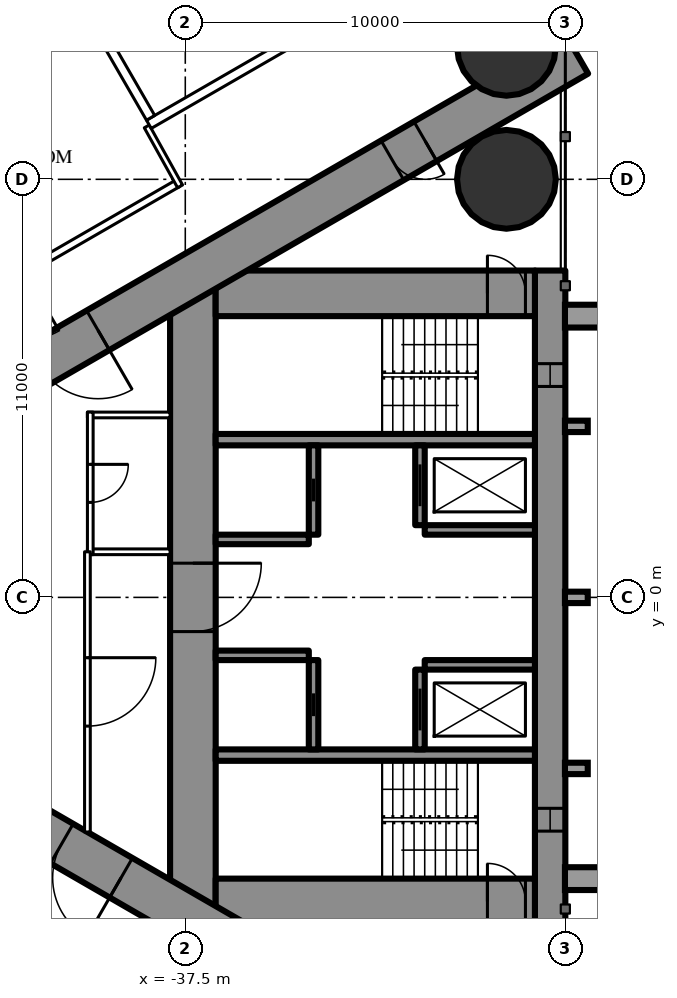
"""IFC4 building model, lengths in metres.
Left out: names, types, materials, properties, quantities, classifications, styles, units other than length and angle.
Written with IfcOpenShell. Run it as: python <this file> out.ifc"""

import sys

from ifc_helpers import new_model, si_unit, direction, frame, frame_2d, origin, origin_2d, place, context, subcontext, project, spatial, rectangle, hollow_circle, extrude, element, fill, save


model = new_model("IFC4")
c1 = context("Model", 3, precision=1e-05, world=origin(), true_north=direction((0.0, 1.0)))
c2 = subcontext(c1, "Body", "Model", "MODEL_VIEW")
j1 = project(units=[si_unit("LENGTHUNIT", "METRE"), si_unit("PLANEANGLEUNIT", "RADIAN")], contexts=[c1])
p1 = place(None, origin())
s1 = spatial("IfcSite", under=j1, at=p1, CompositionType="ELEMENT")
p2 = place(p1, origin())
s2 = spatial("IfcBuilding", under=s1, at=p2, CompositionType="ELEMENT")
p3 = place(p2, frame((0.0, 0.0, 143.1)))
s3 = spatial("IfcBuildingStorey", under=s2, at=p3, CompositionType="ELEMENT", Elevation=143.1)
for number, where, z_axis, x_axis in (
    (1, (-29.05, 11.0, 0.0), (0.0, 0.0, 1.0), (1.0, 0.0, 0.0)),
    (2, (-29.05, 14.5, 0.0), (0.0, 0.0, 1.0), (1.0, 0.0, 0.0)),
):
    element("IfcColumn", number, at=place(p3, frame(where, z_axis=z_axis, x_axis=x_axis)), inside=s3, PredefinedType="COLUMN", context=c2, shape_type="SweptSolid", body=[
        extrude(hollow_circle(Radius=1.3, WallThickness=0.1, at=origin_2d()), origin(), (0.0, 0.0, 1.0), 3.6),
    ])
p4 = place(p3, frame((-27.9, 8.6, 0.0), z_axis=(0.0, 0.0, 1.0), x_axis=(0.0, -1.0, 0.0)))
e3 = element("IfcWall", 3, at=p4, inside=s3, PredefinedType="SHEAR", context=c2, shape_type="SweptSolid", body=[
    extrude(rectangle(XDim=17.2, YDim=0.8, at=frame_2d((8.6, 0.0))), origin(), (0.0, 0.0, 1.0), 3.6),
])
p5 = place(p4, frame((2.45, 0.0, 0.6)))
e4 = element("IfcOpeningElement", 4, at=p5, cuts=e3, PredefinedType="OPENING", context=c2, shape_type="SweptSolid", body=[
    extrude(rectangle(XDim=0.6, YDim=2.1, at=frame_2d((0.3, 1.05))), frame((0.0, 0.41, 0.0), z_axis=(0.0, -1.0, 0.0), x_axis=(1.0, 0.0, 0.0)), (0.0, 0.0, 1.0), 0.82),
])
p6 = place(p4, frame((14.15, 0.0, 0.6)))
e5 = element("IfcOpeningElement", 5, at=p6, cuts=e3, PredefinedType="OPENING", context=c2, shape_type="SweptSolid", body=[
    extrude(rectangle(XDim=0.6, YDim=2.1, at=frame_2d((0.3, 1.05))), frame((0.0, 0.41, 0.0), z_axis=(0.0, -1.0, 0.0), x_axis=(1.0, 0.0, 0.0)), (0.0, 0.0, 1.0), 0.82),
])
p7 = place(p3, frame((-37.3, 8.6, 0.0), z_axis=(0.0, 0.0, 1.0), x_axis=(0.0, -1.0, 0.0)))
e6 = element("IfcWall", 6, at=p7, inside=s3, PredefinedType="SHEAR", context=c2, shape_type="SweptSolid", body=[
    extrude(rectangle(XDim=17.2, YDim=1.2, at=frame_2d((8.6, 0.0))), origin(), (0.0, 0.0, 1.0), 3.6),
])
p8 = place(p7, frame((7.7, 0.0, 0.0)))
e7 = element("IfcOpeningElement", 7, at=p8, cuts=e6, PredefinedType="OPENING", context=c2, shape_type="SweptSolid", body=[
    extrude(rectangle(XDim=1.8, YDim=2.2, at=frame_2d((0.9, 1.1))), frame((0.0, 0.61, 0.0), z_axis=(0.0, -1.0, 0.0), x_axis=(1.0, 0.0, 0.0)), (0.0, 0.0, 1.0), 1.22),
])
p9 = place(p3, frame((-28.3, 8.0, 0.0), z_axis=(0.0, 0.0, 1.0), x_axis=(-1.0, 0.0, 0.0)))
e8 = element("IfcWall", 8, at=p9, inside=s3, PredefinedType="SHEAR", context=c2, shape_type="SweptSolid", body=[
    extrude(rectangle(XDim=8.4, YDim=1.2, at=frame_2d((4.2, 0.0))), origin(), (0.0, 0.0, 1.0), 3.6),
])
p10 = place(p9, frame((0.25, 0.0, 0.0)))
e9 = element("IfcOpeningElement", 9, at=p10, cuts=e8, PredefinedType="OPENING", context=c2, shape_type="SweptSolid", body=[
    extrude(rectangle(XDim=1.0, YDim=2.2, at=frame_2d((0.5, 1.1))), frame((0.0, 0.61, 0.0), z_axis=(0.0, -1.0, 0.0), x_axis=(1.0, 0.0, 0.0)), (0.0, 0.0, 1.0), 1.22),
])
p11 = place(p3, frame((-28.3, -8.0, 0.0), z_axis=(0.0, 0.0, 1.0), x_axis=(-1.0, 0.0, 0.0)))
e10 = element("IfcWall", 10, at=p11, inside=s3, PredefinedType="SHEAR", context=c2, shape_type="SweptSolid", body=[
    extrude(rectangle(XDim=8.4, YDim=1.2, at=frame_2d((4.2, 0.0))), origin(), (0.0, 0.0, 1.0), 3.6),
])
p12 = place(p11, frame((0.25, 0.0, 0.0)))
e11 = element("IfcOpeningElement", 11, at=p12, cuts=e10, PredefinedType="OPENING", context=c2, shape_type="SweptSolid", body=[
    extrude(rectangle(XDim=1.0, YDim=2.2, at=frame_2d((0.5, 1.1))), frame((0.0, 0.61, 0.0), z_axis=(0.0, -1.0, 0.0), x_axis=(1.0, 0.0, 0.0)), (0.0, 0.0, 1.0), 1.22),
])
for number, where, z_axis, x_axis in (
    (12, (-28.3, 4.15, 0.0), (0.0, 0.0, 1.0), (-1.0, 0.0, 0.0)),
    (13, (-28.3, -4.15, 0.0), (0.0, 0.0, 1.0), (-1.0, 0.0, 0.0)),
):
    element("IfcWall", number, at=place(p3, frame(where, z_axis=z_axis, x_axis=x_axis)), inside=s3, PredefinedType="SHEAR", context=c2, shape_type="SweptSolid", body=[
        extrude(rectangle(XDim=8.4, YDim=0.3, at=frame_2d((4.2, 0.0))), origin(), (0.0, 0.0, 1.0), 3.6),
    ])
p13 = place(p3, frame((-31.325, 4.0, 0.0), z_axis=(0.0, 0.0, 1.0), x_axis=(0.0, -1.0, 0.0)))
e14 = element("IfcWall", 14, at=p13, inside=s3, PredefinedType="SHEAR", context=c2, shape_type="SweptSolid", body=[
    extrude(rectangle(XDim=2.1, YDim=0.25, at=frame_2d((1.05, 0.0))), origin(), (0.0, 0.0, 1.0), 3.6),
])
p14 = place(p13, frame((0.5, 0.0, 0.0)))
e15 = element("IfcOpeningElement", 15, at=p14, cuts=e14, PredefinedType="OPENING", context=c2, shape_type="SweptSolid", body=[
    extrude(rectangle(XDim=1.1, YDim=2.2, at=frame_2d((0.55, 1.1))), frame((0.0, 0.135, 0.0), z_axis=(0.0, -1.0, 0.0), x_axis=(1.0, 0.0, 0.0)), (0.0, 0.0, 1.0), 0.27),
])
p15 = place(p3, frame((-34.125, 4.0, 0.0), z_axis=(0.0, 0.0, 1.0), x_axis=(0.0, -1.0, 0.0)))
e16 = element("IfcWall", 16, at=p15, inside=s3, PredefinedType="SHEAR", context=c2, shape_type="SweptSolid", body=[
    extrude(rectangle(XDim=2.35, YDim=0.25, at=frame_2d((1.175, 0.0))), origin(), (0.0, 0.0, 1.0), 3.6),
])
p16 = place(p15, frame((0.875, 0.0, 0.0)))
e17 = element("IfcOpeningElement", 17, at=p16, cuts=e16, PredefinedType="OPENING", context=c2, shape_type="SweptSolid", body=[
    extrude(rectangle(XDim=0.6, YDim=2.0, at=frame_2d((0.3, 1.0))), frame((0.0, 0.135, 0.0), z_axis=(0.0, -1.0, 0.0), x_axis=(1.0, 0.0, 0.0)), (0.0, 0.0, 1.0), 0.27),
])
p17 = place(p3, frame((-28.3, 1.775, 0.0), z_axis=(0.0, 0.0, 1.0), x_axis=(-1.0, 0.0, 0.0)))
e18 = element("IfcWall", 18, at=p17, inside=s3, PredefinedType="SHEAR", context=c2, shape_type="SweptSolid", body=[
    extrude(rectangle(XDim=2.9, YDim=0.25, at=frame_2d((1.45, 0.0))), origin(), (0.0, 0.0, 1.0), 3.6),
])
p18 = place(p3, frame((-34.25, 1.525, 0.0), z_axis=(0.0, 0.0, 1.0), x_axis=(-1.0, 0.0, 0.0)))
e19 = element("IfcWall", 19, at=p18, inside=s3, PredefinedType="SHEAR", context=c2, shape_type="SweptSolid", body=[
    extrude(rectangle(XDim=2.45, YDim=0.25, at=frame_2d((1.225, 0.0))), origin(), (0.0, 0.0, 1.0), 3.6),
])
p19 = place(p3, frame((-31.325, -1.9, 0.0), z_axis=(0.0, 0.0, 1.0), x_axis=(0.0, -1.0, 0.0)))
e20 = element("IfcWall", 20, at=p19, inside=s3, PredefinedType="SHEAR", context=c2, shape_type="SweptSolid", body=[
    extrude(rectangle(XDim=2.1, YDim=0.25, at=frame_2d((1.05, 0.0))), origin(), (0.0, 0.0, 1.0), 3.6),
])
p20 = place(p19, frame((0.5, 0.0, 0.0)))
e21 = element("IfcOpeningElement", 21, at=p20, cuts=e20, PredefinedType="OPENING", context=c2, shape_type="SweptSolid", body=[
    extrude(rectangle(XDim=1.1, YDim=2.2, at=frame_2d((0.55, 1.1))), frame((0.0, 0.135, 0.0), z_axis=(0.0, -1.0, 0.0), x_axis=(1.0, 0.0, 0.0)), (0.0, 0.0, 1.0), 0.27),
])
p21 = place(p3, frame((-34.125, -1.65, 0.0), z_axis=(0.0, 0.0, 1.0), x_axis=(0.0, -1.0, 0.0)))
e22 = element("IfcWall", 22, at=p21, inside=s3, PredefinedType="SHEAR", context=c2, shape_type="SweptSolid", body=[
    extrude(rectangle(XDim=2.35, YDim=0.25, at=frame_2d((1.175, 0.0))), origin(), (0.0, 0.0, 1.0), 3.6),
])
p22 = place(p21, frame((0.875, 0.0, 0.0)))
e23 = element("IfcOpeningElement", 23, at=p22, cuts=e22, PredefinedType="OPENING", context=c2, shape_type="SweptSolid", body=[
    extrude(rectangle(XDim=0.6, YDim=2.0, at=frame_2d((0.3, 1.0))), frame((0.0, 0.135, 0.0), z_axis=(0.0, -1.0, 0.0), x_axis=(1.0, 0.0, 0.0)), (0.0, 0.0, 1.0), 0.27),
])
p23 = place(p3, frame((-28.3, -1.775, 0.0), z_axis=(0.0, 0.0, 1.0), x_axis=(-1.0, 0.0, 0.0)))
e24 = element("IfcWall", 24, at=p23, inside=s3, PredefinedType="SHEAR", context=c2, shape_type="SweptSolid", body=[
    extrude(rectangle(XDim=2.9, YDim=0.25, at=frame_2d((1.45, 0.0))), origin(), (0.0, 0.0, 1.0), 3.6),
])
p24 = place(p3, frame((-34.25, -1.525, 0.0), z_axis=(0.0, 0.0, 1.0), x_axis=(-1.0, 0.0, 0.0)))
e25 = element("IfcWall", 25, at=p24, inside=s3, PredefinedType="SHEAR", context=c2, shape_type="SweptSolid", body=[
    extrude(rectangle(XDim=2.45, YDim=0.25, at=frame_2d((1.225, 0.0))), origin(), (0.0, 0.0, 1.0), 3.6),
])
p25 = place(p3, frame((-27.2, 14.3, 0.0), z_axis=(0.0, 0.0, 1.0), x_axis=(-0.866026593062, -0.499997940104, 0.0)))
e26 = element("IfcWall", 26, at=p25, inside=s3, PredefinedType="SHEAR", context=c2, shape_type="SweptSolid", body=[
    extrude(rectangle(XDim=28.946, YDim=1.2, at=frame_2d((14.473, 0.0))), origin(), (0.0, 0.0, 1.0), 3.6),
])
p26 = place(p25, frame((4.6, 0.0, 0.0)))
e27 = element("IfcOpeningElement", 27, at=p26, cuts=e26, PredefinedType="OPENING", context=c2, shape_type="SweptSolid", body=[
    extrude(rectangle(XDim=1.0, YDim=2.2, at=frame_2d((0.5, 1.1))), frame((0.0, 0.61, 0.0), z_axis=(0.0, -1.0, 0.0), x_axis=(1.0, 0.0, 0.0)), (0.0, 0.0, 1.0), 1.22),
])
p27 = place(p25, frame((14.545, 0.0, 0.0)))
e28 = element("IfcOpeningElement", 28, at=p27, cuts=e26, PredefinedType="OPENING", context=c2, shape_type="SweptSolid", body=[
    extrude(rectangle(XDim=1.8, YDim=2.2, at=frame_2d((0.9, 1.1))), frame((0.0, 0.61, 0.0), z_axis=(0.0, -1.0, 0.0), x_axis=(1.0, 0.0, 0.0)), (0.0, 0.0, 1.0), 1.22),
])
p28 = place(p3, frame((-27.2, -14.3, 0.0), z_axis=(0.0, 0.0, 1.0), x_axis=(-0.866024021859, 0.500002393557, 0.0)))
e29 = element("IfcWall", 29, at=p28, inside=s3, PredefinedType="SHEAR", context=c2, shape_type="SweptSolid", body=[
    extrude(rectangle(XDim=27.907, YDim=1.2, at=frame_2d((13.954, 0.0))), origin(), (0.0, 0.0, 1.0), 3.6),
])
p29 = place(p28, frame((4.6, 0.0, 0.0)))
e30 = element("IfcOpeningElement", 30, at=p29, cuts=e29, PredefinedType="OPENING", context=c2, shape_type="SweptSolid", body=[
    extrude(rectangle(XDim=1.0, YDim=2.2, at=frame_2d((0.5, 1.1))), frame((0.0, 0.61, 0.0), z_axis=(0.0, -1.0, 0.0), x_axis=(1.0, 0.0, 0.0)), (0.0, 0.0, 1.0), 1.22),
])
p30 = place(p28, frame((13.845, 0.0, 0.0)))
e31 = element("IfcOpeningElement", 31, at=p30, cuts=e29, PredefinedType="OPENING", context=c2, shape_type="SweptSolid", body=[
    extrude(rectangle(XDim=1.8, YDim=2.2, at=frame_2d((0.9, 1.1))), frame((0.0, 0.61, 0.0), z_axis=(0.0, -1.0, 0.0), x_axis=(1.0, 0.0, 0.0)), (0.0, 0.0, 1.0), 1.22),
])
p31 = place(p3, frame((-41.245, 19.666, 0.0), z_axis=(0.0, 0.0, 1.0), x_axis=(-0.880492350889, -0.474060354835, 0.0)))
e32 = element("IfcWall", 32, at=p31, inside=s3, PredefinedType="SHEAR", context=c2, shape_type="SweptSolid", body=[
    extrude(rectangle(XDim=12.173, YDim=1.4, at=frame_2d((6.086, 0.0))), origin(), (0.0, 0.0, 1.0), 3.6),
])
p32 = place(p31, frame((4.586, 0.0, 0.6)))
e33 = element("IfcOpeningElement", 33, at=p32, cuts=e32, PredefinedType="OPENING", context=c2, shape_type="SweptSolid", body=[
    extrude(rectangle(XDim=3.0, YDim=1.2, at=frame_2d((1.5, 0.6))), frame((0.0, 0.71, 0.0), z_axis=(0.0, -1.0, 0.0), x_axis=(1.0, 0.0, 0.0)), (0.0, 0.0, 1.0), 1.42),
])
p33 = place(p3, frame((-37.7, 10.894, 0.0), z_axis=(0.0, 0.0, 1.0), x_axis=(-0.866027905338, -0.499995667157, 0.0)))
e34 = element("IfcWall", 34, at=p33, inside=s3, PredefinedType="PARTITIONING", context=c2, shape_type="SweptSolid", body=[
    extrude(rectangle(XDim=21.787, YDim=0.2, at=frame_2d((10.894, 0.0))), origin(), (0.0, 0.0, 1.0), 3.35),
])
p34 = place(p33, frame((14.296, 0.0, 0.0)))
e35 = element("IfcOpeningElement", 35, at=p34, cuts=e34, PredefinedType="OPENING", context=c2, shape_type="SweptSolid", body=[
    extrude(rectangle(XDim=1.8, YDim=2.2, at=frame_2d((0.9, 1.1))), frame((0.0, 0.11, 0.0), z_axis=(0.0, -1.0, 0.0), x_axis=(1.0, 0.0, 0.0)), (0.0, 0.0, 1.0), 0.22),
])
p35 = place(p33, frame((19.399, 0.0, 0.0)))
e36 = element("IfcOpeningElement", 36, at=p35, cuts=e34, PredefinedType="OPENING", context=c2, shape_type="SweptSolid", body=[
    extrude(rectangle(XDim=1.8, YDim=2.14, at=frame_2d((0.9, 1.07))), frame((0.0, 0.11, 0.0), z_axis=(0.0, -1.0, 0.0), x_axis=(1.0, 0.0, 0.0)), (0.0, 0.0, 1.0), 0.22),
])
p36 = place(p33, frame((4.64, 0.0, 0.0)))
e37 = element("IfcOpeningElement", 37, at=p36, cuts=e34, PredefinedType="OPENING", context=c2, shape_type="SweptSolid", body=[
    extrude(rectangle(XDim=1.8, YDim=2.2, at=frame_2d((0.9, 1.1))), frame((0.0, 0.11, 0.0), z_axis=(0.0, -1.0, 0.0), x_axis=(1.0, 0.0, 0.0)), (0.0, 0.0, 1.0), 0.22),
])
p37 = place(p3, frame((-36.92, -11.344, 0.0), z_axis=(0.0, 0.0, 1.0), x_axis=(-0.866028313256, 0.499994960614, 0.0)))
e38 = element("IfcWall", 38, at=p37, inside=s3, PredefinedType="PARTITIONING", context=c2, shape_type="SweptSolid", body=[
    extrude(rectangle(XDim=22.568, YDim=0.2, at=frame_2d((11.284, 0.0))), origin(), (0.0, 0.0, 1.0), 3.35),
])
p38 = place(p37, frame((20.24, 0.0, 0.0)))
e39 = element("IfcOpeningElement", 39, at=p38, cuts=e38, PredefinedType="OPENING", context=c2, shape_type="SweptSolid", body=[
    extrude(rectangle(XDim=1.8, YDim=2.14, at=frame_2d((0.9, 1.07))), frame((0.0, 0.11, 0.0), z_axis=(0.0, -1.0, 0.0), x_axis=(1.0, 0.0, 0.0)), (0.0, 0.0, 1.0), 0.22),
])
p39 = place(p37, frame((14.946, 0.0, 0.0)))
e40 = element("IfcOpeningElement", 40, at=p39, cuts=e38, PredefinedType="OPENING", context=c2, shape_type="SweptSolid", body=[
    extrude(rectangle(XDim=1.8, YDim=2.2, at=frame_2d((0.9, 1.1))), frame((0.0, 0.11, 0.0), z_axis=(0.0, -1.0, 0.0), x_axis=(1.0, 0.0, 0.0)), (0.0, 0.0, 1.0), 0.22),
])
p40 = place(p37, frame((5.091, 0.0, 0.0)))
e41 = element("IfcOpeningElement", 41, at=p40, cuts=e38, PredefinedType="OPENING", context=c2, shape_type="SweptSolid", body=[
    extrude(rectangle(XDim=1.8, YDim=2.2, at=frame_2d((0.9, 1.1))), frame((0.0, 0.11, 0.0), z_axis=(0.0, -1.0, 0.0), x_axis=(1.0, 0.0, 0.0)), (0.0, 0.0, 1.0), 0.22),
])
p41 = place(p3, frame((-38.513, 12.392, 0.0), z_axis=(0.0, 0.0, 1.0), x_axis=(0.485585508183, -0.874189175317, 0.0)))
e42 = element("IfcWall", 42, at=p41, inside=s3, PredefinedType="PARTITIONING", context=c2, shape_type="SweptSolid", body=[
    extrude(rectangle(XDim=1.805, YDim=0.15, at=frame_2d((0.902, 0.0))), origin(), (0.0, 0.0, 1.0), 3.35),
])
for number, where, z_axis, x_axis in (
    (43, (-37.9, 1.2, 0.0), (0.0, 0.0, 1.0), (-1.0, 0.0, 0.0)),
    (44, (-37.9, 4.8, 0.0), (0.0, 0.0, 1.0), (-1.0, 0.0, 0.0)),
):
    element("IfcWall", number, at=place(p3, frame(where, z_axis=z_axis, x_axis=x_axis)), inside=s3, PredefinedType="PARTITIONING", context=c2, shape_type="SweptSolid", body=[
        extrude(rectangle(XDim=2.175, YDim=0.15, at=frame_2d((1.087, 0.0))), origin(), (0.0, 0.0, 1.0), 3.35),
    ])
p42 = place(p3, frame((-40.0, 4.875, 0.0), z_axis=(0.0, 0.0, 1.0), x_axis=(0.0, -1.0, 0.0)))
e45 = element("IfcWall", 45, at=p42, inside=s3, PredefinedType="PARTITIONING", context=c2, shape_type="SweptSolid", body=[
    extrude(rectangle(XDim=3.75, YDim=0.15, at=frame_2d((1.875, 0.0))), origin(), (0.0, 0.0, 1.0), 3.35),
])
p43 = place(p42, frame((1.375, 0.0, 0.0)))
e46 = element("IfcOpeningElement", 46, at=p43, cuts=e45, PredefinedType="OPENING", context=c2, shape_type="SweptSolid", body=[
    extrude(rectangle(XDim=1.0, YDim=2.2, at=frame_2d((0.5, 1.1))), frame((0.0, 0.085, 0.0), z_axis=(0.0, -1.0, 0.0), x_axis=(1.0, 0.0, 0.0)), (0.0, 0.0, 1.0), 0.17),
])
p44 = place(p3, frame((-40.075, 1.2, 0.0), z_axis=(0.0, 0.0, 1.0), x_axis=(0.0, -1.0, 0.0)))
e47 = element("IfcWall", 47, at=p44, inside=s3, PredefinedType="PARTITIONING", context=c2, shape_type="SweptSolid", body=[
    extrude(rectangle(XDim=7.374, YDim=0.15, at=frame_2d((3.687, 0.0))), origin(), (0.0, 0.0, 1.0), 3.35),
])
p45 = place(p44, frame((2.787, 0.0, 0.0)))
e48 = element("IfcOpeningElement", 48, at=p45, cuts=e47, PredefinedType="OPENING", context=c2, shape_type="SweptSolid", body=[
    extrude(rectangle(XDim=1.8, YDim=2.2, at=frame_2d((0.9, 1.1))), frame((0.0, 0.085, 0.0), z_axis=(0.0, -1.0, 0.0), x_axis=(1.0, 0.0, 0.0)), (0.0, 0.0, 1.0), 0.17),
])
p46 = place(p3, frame((-31.01, 16.747, 0.0), z_axis=(0.0, 0.0, 1.0), x_axis=(-0.866028165386, -0.499995216735, 0.0)))
e49 = element("IfcWall", 49, at=p46, inside=s3, PredefinedType="PARTITIONING", context=c2, shape_type="SweptSolid", body=[
    extrude(rectangle(XDim=8.6, YDim=0.25, at=frame_2d((4.3, 0.0))), origin(), (0.0, 0.0, 1.0), 3.35),
])
p47 = place(p3, frame((-38.413, 12.618, 0.0), z_axis=(0.0, 0.0, 1.0), x_axis=(-0.499872130319, 0.866099216793, 0.0)))
e50 = element("IfcWall", 50, at=p47, inside=s3, PredefinedType="PARTITIONING", context=c2, shape_type="SweptSolid", body=[
    extrude(rectangle(XDim=3.2, YDim=0.25, at=frame_2d((1.6, 0.0))), origin(), (0.0, 0.0, 1.0), 3.35),
])
p48 = place(p43, origin())
e51 = element("IfcDoor", 51, at=p48, inside=s3, OperationType="SINGLE_SWING_LEFT", PredefinedType="DOOR", context=c2, shape_type="SweptSolid", body=[
    extrude(rectangle(XDim=1.0, YDim=2.2, at=frame_2d((0.5, 1.1))), frame((0.0, 0.025, 0.0), z_axis=(0.0, -1.0, 0.0), x_axis=(1.0, 0.0, 0.0)), (0.0, 0.0, 1.0), 0.05),
])
fill(e46, e51)
p49 = place(p45, origin())
e52 = element("IfcDoor", 52, at=p49, inside=s3, OperationType="DOUBLE_DOOR_SINGLE_SWING", PredefinedType="DOOR", context=c2, shape_type="SweptSolid", body=[
    extrude(rectangle(XDim=1.8, YDim=2.2, at=frame_2d((0.9, 1.1))), frame((0.0, 0.025, 0.0), z_axis=(0.0, -1.0, 0.0), x_axis=(1.0, 0.0, 0.0)), (0.0, 0.0, 1.0), 0.05),
])
fill(e48, e52)
p50 = place(p26, origin())
e53 = element("IfcDoor", 53, at=p50, inside=s3, OperationType="SINGLE_SWING_LEFT", PredefinedType="DOOR", context=c2, shape_type="SweptSolid", body=[
    extrude(rectangle(XDim=1.0, YDim=2.2, at=frame_2d((0.5, 1.1))), frame((0.0, 0.025, 0.0), z_axis=(0.0, -1.0, 0.0), x_axis=(1.0, 0.0, 0.0)), (0.0, 0.0, 1.0), 0.05),
])
fill(e27, e53)
p51 = place(p27, origin())
e54 = element("IfcDoor", 54, at=p51, inside=s3, OperationType="DOUBLE_DOOR_SINGLE_SWING", PredefinedType="DOOR", context=c2, shape_type="SweptSolid", body=[
    extrude(rectangle(XDim=1.8, YDim=2.2, at=frame_2d((0.9, 1.1))), frame((0.0, 0.025, 0.0), z_axis=(0.0, -1.0, 0.0), x_axis=(1.0, 0.0, 0.0)), (0.0, 0.0, 1.0), 0.05),
])
fill(e28, e54)
p52 = place(p30, origin())
e55 = element("IfcDoor", 55, at=p52, inside=s3, OperationType="DOUBLE_DOOR_SINGLE_SWING", PredefinedType="DOOR", context=c2, shape_type="SweptSolid", body=[
    extrude(rectangle(XDim=1.8, YDim=2.2, at=frame_2d((0.9, 1.1))), frame((0.0, 0.025, 0.0), z_axis=(0.0, -1.0, 0.0), x_axis=(1.0, 0.0, 0.0)), (0.0, 0.0, 1.0), 0.05),
])
fill(e31, e55)
p53 = place(p8, origin())
e56 = element("IfcDoor", 56, at=p53, inside=s3, OperationType="DOUBLE_DOOR_SINGLE_SWING", PredefinedType="DOOR", context=c2, shape_type="SweptSolid", body=[
    extrude(rectangle(XDim=1.8, YDim=2.2, at=frame_2d((0.9, 1.1))), frame((0.0, 0.025, 0.0), z_axis=(0.0, -1.0, 0.0), x_axis=(1.0, 0.0, 0.0)), (0.0, 0.0, 1.0), 0.05),
])
fill(e7, e56)
p54 = place(p10, origin())
e57 = element("IfcDoor", 57, at=p54, inside=s3, OperationType="SINGLE_SWING_RIGHT", PredefinedType="DOOR", context=c2, shape_type="SweptSolid", body=[
    extrude(rectangle(XDim=1.0, YDim=2.2, at=frame_2d((0.5, 1.1))), frame((0.0, 0.025, 0.0), z_axis=(0.0, -1.0, 0.0), x_axis=(1.0, 0.0, 0.0)), (0.0, 0.0, 1.0), 0.05),
])
fill(e9, e57)
p55 = place(p12, origin())
e58 = element("IfcDoor", 58, at=p55, inside=s3, OperationType="SINGLE_SWING_RIGHT", PredefinedType="DOOR", context=c2, shape_type="SweptSolid", body=[
    extrude(rectangle(XDim=1.0, YDim=2.2, at=frame_2d((0.5, 1.1))), frame((0.0, 0.025, 0.0), z_axis=(0.0, -1.0, 0.0), x_axis=(1.0, 0.0, 0.0)), (0.0, 0.0, 1.0), 0.05),
])
fill(e11, e58)
p56 = place(p14, origin())
e59 = element("IfcDoor", 59, at=p56, inside=s3, OperationType="SLIDING_TO_LEFT", PredefinedType="USERDEFINED", context=c2, shape_type="SweptSolid", body=[
    extrude(rectangle(XDim=1.1, YDim=2.2, at=frame_2d((0.55, 1.1))), frame((0.0, 0.025, 0.0), z_axis=(0.0, -1.0, 0.0), x_axis=(1.0, 0.0, 0.0)), (0.0, 0.0, 1.0), 0.05),
])
fill(e15, e59)
p57 = place(p20, origin())
e60 = element("IfcDoor", 60, at=p57, inside=s3, OperationType="SLIDING_TO_LEFT", PredefinedType="USERDEFINED", context=c2, shape_type="SweptSolid", body=[
    extrude(rectangle(XDim=1.1, YDim=2.2, at=frame_2d((0.55, 1.1))), frame((0.0, 0.025, 0.0), z_axis=(0.0, -1.0, 0.0), x_axis=(1.0, 0.0, 0.0)), (0.0, 0.0, 1.0), 0.05),
])
fill(e21, e60)
p58 = place(p16, origin())
e61 = element("IfcDoor", 61, at=p58, inside=s3, OperationType="SLIDING_TO_LEFT", PredefinedType="DOOR", context=c2, shape_type="SweptSolid", body=[
    extrude(rectangle(XDim=0.6, YDim=2.0, at=frame_2d((0.3, 1.0))), frame((0.0, 0.025, 0.0), z_axis=(0.0, -1.0, 0.0), x_axis=(1.0, 0.0, 0.0)), (0.0, 0.0, 1.0), 0.05),
])
fill(e17, e61)
p59 = place(p22, origin())
e62 = element("IfcDoor", 62, at=p59, inside=s3, OperationType="SLIDING_TO_LEFT", PredefinedType="DOOR", context=c2, shape_type="SweptSolid", body=[
    extrude(rectangle(XDim=0.6, YDim=2.0, at=frame_2d((0.3, 1.0))), frame((0.0, 0.025, 0.0), z_axis=(0.0, -1.0, 0.0), x_axis=(1.0, 0.0, 0.0)), (0.0, 0.0, 1.0), 0.05),
])
fill(e23, e62)
p60 = place(p5, origin())
e63 = element("IfcWindow", 63, at=p60, inside=s3, PartitioningType="SINGLE_PANEL", PredefinedType="WINDOW", context=c2, shape_type="SweptSolid", body=[
    extrude(rectangle(XDim=0.6, YDim=2.1, at=frame_2d((0.3, 1.05))), frame((0.0, 0.03, 0.0), z_axis=(0.0, -1.0, 0.0), x_axis=(1.0, 0.0, 0.0)), (0.0, 0.0, 1.0), 0.06),
])
fill(e4, e63)
p61 = place(p6, origin())
e64 = element("IfcWindow", 64, at=p61, inside=s3, PartitioningType="SINGLE_PANEL", PredefinedType="WINDOW", context=c2, shape_type="SweptSolid", body=[
    extrude(rectangle(XDim=0.6, YDim=2.1, at=frame_2d((0.3, 1.05))), frame((0.0, 0.03, 0.0), z_axis=(0.0, -1.0, 0.0), x_axis=(1.0, 0.0, 0.0)), (0.0, 0.0, 1.0), 0.06),
])
fill(e5, e64)
save(model, sys.argv[1])
